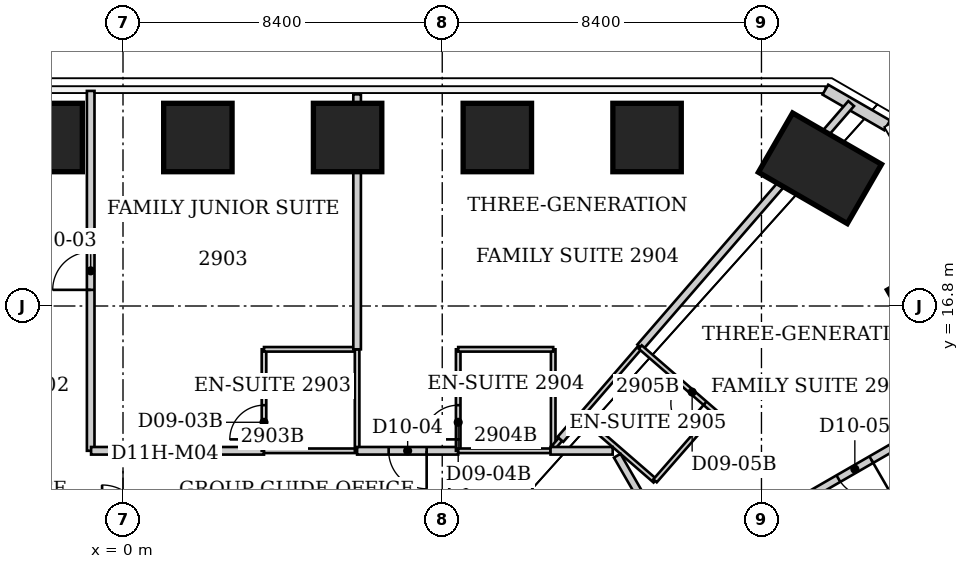
"""IFC4 building model, lengths in metres.
Left out: names, types, materials, properties, quantities, classifications, styles, units other than length and angle.
Written with IfcOpenShell. Run it as: python <this file> out.ifc"""

import sys

from ifc_helpers import new_model, si_unit, direction, frame, frame_2d, origin, origin_2d, place, context, subcontext, project, spatial, rectangle, extrude, element, fill, save


model = new_model("IFC4")
c1 = context("Model", 3, precision=1e-05, world=origin(), true_north=direction((0.0, 1.0)))
c2 = subcontext(c1, "Body", "Model", "MODEL_VIEW")
j1 = project(units=[si_unit("LENGTHUNIT", "METRE"), si_unit("PLANEANGLEUNIT", "RADIAN")], contexts=[c1])
p1 = place(None, origin())
s1 = spatial("IfcSite", under=j1, at=p1, CompositionType="ELEMENT")
p2 = place(p1, origin())
s2 = spatial("IfcBuilding", under=s1, at=p2, CompositionType="ELEMENT")
p3 = place(p2, frame((0.0, 0.0, 119.6)))
s3 = spatial("IfcBuildingStorey", under=s2, at=p3, CompositionType="ELEMENT", Elevation=119.6)
for number, where, z_axis, x_axis in (
    (1, (-1.97, 21.234, 0.0), (0.0, 0.0, 1.0), (0.0, 1.0, 0.0)),
    (2, (1.97, 21.234, 0.0), (0.0, 0.0, 1.0), (0.0, 1.0, 0.0)),
    (3, (5.91, 21.234, 0.0), (0.0, 0.0, 1.0), (0.0, 1.0, 0.0)),
    (4, (9.85, 21.234, 0.0), (0.0, 0.0, 1.0), (0.0, 1.0, 0.0)),
    (5, (13.79, 21.234, 0.0), (0.0, 0.0, 1.0), (0.0, 1.0, 0.0)),
):
    element("IfcColumn", number, at=place(p3, frame(where, z_axis=z_axis, x_axis=x_axis)), inside=s3, PredefinedType="COLUMN", context=c2, shape_type="SweptSolid", body=[
        extrude(rectangle(XDim=1.8, YDim=1.8, at=origin_2d()), origin(), (0.0, 0.0, 1.0), 3.8),
    ])
p4 = place(p3, frame((18.339, 20.424, 0.0), z_axis=(0.0, 0.0, 1.0), x_axis=(0.5, 0.866025403784, 0.0)))
e6 = element("IfcColumn", 6, at=p4, inside=s3, PredefinedType="COLUMN", context=c2, shape_type="SweptSolid", body=[
    extrude(rectangle(XDim=1.8, YDim=2.7, at=origin_2d()), origin(), (0.0, 0.0, 1.0), 3.8),
])
p5 = place(p3, frame((21.346, 16.891, 0.0), z_axis=(0.0, 0.0, 1.0), x_axis=(0.866025403784, 0.5, 0.0)))
e7 = element("IfcColumn", 7, at=p5, inside=s3, PredefinedType="COLUMN", context=c2, shape_type="SweptSolid", body=[
    extrude(rectangle(XDim=1.8, YDim=1.8, at=origin_2d()), origin(), (0.0, 0.0, 1.0), 3.8),
])
p6 = place(p3, frame((18.481, 22.494, 0.0), z_axis=(0.0, 0.0, 1.0), x_axis=(0.865988793993, -0.500063404658, 0.0)))
e8 = element("IfcWall", 8, at=p6, inside=s3, PredefinedType="SOLIDWALL", context=c2, shape_type="SweptSolid", body=[
    extrude(rectangle(XDim=1.88, YDim=0.3, at=frame_2d((0.94, 0.0))), origin(), (0.0, 0.0, 1.0), 3.64),
])
p7 = place(p3, frame((-0.85, 12.99, 0.0), z_axis=(0.0, 0.0, 1.0), x_axis=(0.0, 1.0, 0.0)))
e9 = element("IfcWall", 9, at=p7, inside=s3, PredefinedType="PARTITIONING", context=c2, shape_type="SweptSolid", body=[
    extrude(rectangle(XDim=9.47, YDim=0.2, at=frame_2d((4.735, 0.0))), origin(), (0.0, 0.0, 1.0), 3.64),
])
p8 = place(p7, frame((4.235, 0.0, 0.0)))
e10 = element("IfcOpeningElement", 10, at=p8, cuts=e9, PredefinedType="OPENING", context=c2, shape_type="SweptSolid", body=[
    extrude(rectangle(XDim=1.0, YDim=2.13, at=frame_2d((0.5, 1.065))), frame((0.0, 0.1, 0.0), z_axis=(0.0, -1.0, 0.0), x_axis=(1.0, 0.0, 0.0)), (0.0, 0.0, 1.0), 0.2),
])
p9 = place(p3, frame((3.71, 12.99, 0.0), z_axis=(0.0, 0.0, 1.0), x_axis=(-1.0, 0.0, 0.0)))
e11 = element("IfcWall", 11, at=p9, inside=s3, PredefinedType="PARTITIONING", context=c2, shape_type="SweptSolid", body=[
    extrude(rectangle(XDim=4.55, YDim=0.2, at=frame_2d((2.275, 0.0))), origin(), (0.0, 0.0, 1.0), 3.64),
])
p10 = place(p3, frame((3.71, 15.66, 0.0), z_axis=(0.0, 0.0, 1.0), x_axis=(0.0, -1.0, 0.0)))
e12 = element("IfcWall", 12, at=p10, inside=s3, PredefinedType="PARTITIONING", context=c2, shape_type="SweptSolid", body=[
    extrude(rectangle(XDim=2.67, YDim=0.12, at=frame_2d((1.335, 0.0))), origin(), (0.0, 0.0, 1.0), 3.64),
])
p11 = place(p10, frame((1.47, 0.0, 0.0)))
e13 = element("IfcOpeningElement", 13, at=p11, cuts=e12, PredefinedType="OPENING", context=c2, shape_type="SweptSolid", body=[
    extrude(rectangle(XDim=0.9, YDim=2.03, at=frame_2d((0.45, 1.015))), frame((0.0, 0.06, 0.0), z_axis=(0.0, -1.0, 0.0), x_axis=(1.0, 0.0, 0.0)), (0.0, 0.0, 1.0), 0.12),
])
for number, where, z_axis, x_axis in (
    (14, (6.16, 12.99, 0.0), (0.0, 0.0, 1.0), (-1.0, 0.0, 0.0)),
    (15, (6.16, 15.66, 0.0), (0.0, 0.0, 1.0), (-1.0, 0.0, 0.0)),
):
    element("IfcWall", number, at=place(p3, frame(where, z_axis=z_axis, x_axis=x_axis)), inside=s3, PredefinedType="PARTITIONING", context=c2, shape_type="SweptSolid", body=[
        extrude(rectangle(XDim=2.45, YDim=0.12, at=frame_2d((1.225, 0.0))), origin(), (0.0, 0.0, 1.0), 3.64),
    ])
p12 = place(p3, frame((6.16, 15.66, 0.0), z_axis=(0.0, 0.0, 1.0), x_axis=(0.0, -1.0, 0.0)))
e16 = element("IfcWall", 16, at=p12, inside=s3, PredefinedType="PARTITIONING", context=c2, shape_type="SweptSolid", body=[
    extrude(rectangle(XDim=2.67, YDim=0.12, at=frame_2d((1.335, 0.0))), origin(), (0.0, 0.0, 1.0), 3.64),
])
p13 = place(p3, frame((6.16, 22.37, 0.0), z_axis=(0.0, 0.0, 1.0), x_axis=(0.0, -1.0, 0.0)))
e17 = element("IfcWall", 17, at=p13, inside=s3, PredefinedType="PARTITIONING", context=c2, shape_type="SweptSolid", body=[
    extrude(rectangle(XDim=6.71, YDim=0.2, at=frame_2d((3.355, 0.0))), origin(), (0.0, 0.0, 1.0), 3.64),
])
p14 = place(p3, frame((8.82, 12.99, 0.0), z_axis=(0.0, 0.0, 1.0), x_axis=(-1.0, 0.0, 0.0)))
e18 = element("IfcWall", 18, at=p14, inside=s3, PredefinedType="PARTITIONING", context=c2, shape_type="SweptSolid", body=[
    extrude(rectangle(XDim=2.66, YDim=0.2, at=frame_2d((1.33, 0.0))), origin(), (0.0, 0.0, 1.0), 3.64),
])
p15 = place(p14, frame((0.83, 0.0, 0.0)))
e19 = element("IfcOpeningElement", 19, at=p15, cuts=e18, PredefinedType="OPENING", context=c2, shape_type="SweptSolid", body=[
    extrude(rectangle(XDim=1.0, YDim=2.13, at=frame_2d((0.5, 1.065))), frame((0.0, 0.1, 0.0), z_axis=(0.0, -1.0, 0.0), x_axis=(1.0, 0.0, 0.0)), (0.0, 0.0, 1.0), 0.2),
])
p16 = place(p3, frame((8.82, 15.66, 0.0), z_axis=(0.0, 0.0, 1.0), x_axis=(0.0, -1.0, 0.0)))
e20 = element("IfcWall", 20, at=p16, inside=s3, PredefinedType="PARTITIONING", context=c2, shape_type="SweptSolid", body=[
    extrude(rectangle(XDim=2.67, YDim=0.12, at=frame_2d((1.335, 0.0))), origin(), (0.0, 0.0, 1.0), 3.64),
])
p17 = place(p16, frame((1.47, 0.0, 0.0)))
e21 = element("IfcOpeningElement", 21, at=p17, cuts=e20, PredefinedType="OPENING", context=c2, shape_type="SweptSolid", body=[
    extrude(rectangle(XDim=0.9, YDim=2.03, at=frame_2d((0.45, 1.015))), frame((0.0, 0.06, 0.0), z_axis=(0.0, -1.0, 0.0), x_axis=(1.0, 0.0, 0.0)), (0.0, 0.0, 1.0), 0.12),
])
p18 = place(p3, frame((11.25, 12.99, 0.0), z_axis=(0.0, 0.0, 1.0), x_axis=(-1.0, 0.0, 0.0)))
e22 = element("IfcWall", 22, at=p18, inside=s3, PredefinedType="PARTITIONING", context=c2, shape_type="SweptSolid", body=[
    extrude(rectangle(XDim=2.43, YDim=0.12, at=frame_2d((1.215, 0.0))), origin(), (0.0, 0.0, 1.0), 3.64),
])
p19 = place(p3, frame((11.32, 13.07, 0.0), z_axis=(0.0, 0.0, 1.0), x_axis=(0.0, 1.0, 0.0)))
e23 = element("IfcWall", 23, at=p19, inside=s3, PredefinedType="PARTITIONING", context=c2, shape_type="SweptSolid", body=[
    extrude(rectangle(XDim=2.59, YDim=0.12, at=frame_2d((1.295, 0.0))), origin(), (0.0, 0.0, 1.0), 3.64),
])
p20 = place(p3, frame((11.32, 15.66, 0.0), z_axis=(0.0, 0.0, 1.0), x_axis=(-1.0, 0.0, 0.0)))
e24 = element("IfcWall", 24, at=p20, inside=s3, PredefinedType="PARTITIONING", context=c2, shape_type="SweptSolid", body=[
    extrude(rectangle(XDim=2.5, YDim=0.12, at=frame_2d((1.25, 0.0))), origin(), (0.0, 0.0, 1.0), 3.64),
])
p21 = place(p3, frame((11.336, 13.089, 0.0), z_axis=(0.0, 0.0, 1.0), x_axis=(0.65328489719, 0.757112173396, 0.0)))
e25 = element("IfcWall", 25, at=p21, inside=s3, PredefinedType="PARTITIONING", context=c2, shape_type="SweptSolid", body=[
    extrude(rectangle(XDim=0.266, YDim=0.12, at=frame_2d((0.133, 0.0))), origin(), (0.0, 0.0, 1.0), 3.64),
])
p22 = place(p3, frame((11.51, 13.29, 0.0), z_axis=(0.0, 0.0, 1.0), x_axis=(0.655976713225, 0.754781128345, 0.0)))
e26 = element("IfcWall", 26, at=p22, inside=s3, PredefinedType="PARTITIONING", context=c2, shape_type="SweptSolid", body=[
    extrude(rectangle(XDim=0.808, YDim=0.2, at=frame_2d((0.404, 0.0))), origin(), (0.0, 0.0, 1.0), 3.64),
])
p23 = place(p3, frame((12.039, 13.901, 0.0), z_axis=(0.0, 0.0, 1.0), x_axis=(0.653622514847, 0.756820723874, 0.0)))
e27 = element("IfcWall", 27, at=p23, inside=s3, PredefinedType="PARTITIONING", context=c2, shape_type="SweptSolid", body=[
    extrude(rectangle(XDim=2.404, YDim=0.12, at=frame_2d((1.202, 0.0))), origin(), (0.0, 0.0, 1.0), 3.64),
])
p24 = place(p3, frame((12.04, 13.9, 0.0), z_axis=(0.0, 0.0, 1.0), x_axis=(0.755437535555, -0.655220672655, 0.0)))
e28 = element("IfcWall", 28, at=p24, inside=s3, PredefinedType="PARTITIONING", context=c2, shape_type="SweptSolid", body=[
    extrude(rectangle(XDim=2.594, YDim=0.12, at=frame_2d((1.297, 0.0))), origin(), (0.0, 0.0, 1.0), 3.64),
])
p25 = place(p3, frame((12.885, 12.99, 0.0), z_axis=(0.0, 0.0, 1.0), x_axis=(-1.0, 0.0, 0.0)))
e29 = element("IfcWall", 29, at=p25, inside=s3, PredefinedType="PARTITIONING", context=c2, shape_type="SweptSolid", body=[
    extrude(rectangle(XDim=1.635, YDim=0.2, at=frame_2d((0.817, 0.0))), origin(), (0.0, 0.0, 1.0), 3.64),
])
p26 = place(p3, frame((13.005, 12.86, 0.0), z_axis=(0.0, 0.0, 1.0), x_axis=(0.500007161152, -0.866021269252, 0.0)))
e30 = element("IfcWall", 30, at=p26, inside=s3, PredefinedType="PARTITIONING", context=c2, shape_type="SweptSolid", body=[
    extrude(rectangle(XDim=3.415, YDim=0.2, at=frame_2d((1.707, 0.0))), origin(), (0.0, 0.0, 1.0), 3.64),
])
p27 = place(p3, frame((13.61, 15.72, 0.0), z_axis=(0.0, 0.0, 1.0), x_axis=(0.654752892245, 0.75584300625, 0.0)))
e31 = element("IfcWall", 31, at=p27, inside=s3, PredefinedType="PARTITIONING", context=c2, shape_type="SweptSolid", body=[
    extrude(rectangle(XDim=8.477, YDim=0.2, at=frame_2d((4.238, 0.0))), origin(), (0.0, 0.0, 1.0), 3.64),
])
p28 = place(p3, frame((14.0, 12.2, 0.0), z_axis=(0.0, 0.0, 1.0), x_axis=(0.657626528627, 0.753344110514, 0.0)))
e32 = element("IfcWall", 32, at=p28, inside=s3, PredefinedType="PARTITIONING", context=c2, shape_type="SweptSolid", body=[
    extrude(rectangle(XDim=2.403, YDim=0.12, at=frame_2d((1.201, 0.0))), origin(), (0.0, 0.0, 1.0), 3.64),
])
p29 = place(p3, frame((15.58, 14.01, 0.0), z_axis=(0.0, 0.0, 1.0), x_axis=(-0.755185511235, 0.655511131576, 0.0)))
e33 = element("IfcWall", 33, at=p29, inside=s3, PredefinedType="PARTITIONING", context=c2, shape_type="SweptSolid", body=[
    extrude(rectangle(XDim=2.609, YDim=0.12, at=frame_2d((1.304, 0.0))), origin(), (0.0, 0.0, 1.0), 3.64),
])
p30 = place(p29, frame((0.35, 0.0, 0.0)))
e34 = element("IfcOpeningElement", 34, at=p30, cuts=e33, PredefinedType="OPENING", context=c2, shape_type="SweptSolid", body=[
    extrude(rectangle(XDim=0.9, YDim=2.03, at=frame_2d((0.45, 1.015))), frame((0.0, 0.06, 0.0), z_axis=(0.0, -1.0, 0.0), x_axis=(1.0, 0.0, 0.0)), (0.0, 0.0, 1.0), 0.12),
])
p31 = place(p3, frame((18.46, 9.27, 0.0), z_axis=(0.0, 0.0, 1.0), x_axis=(0.865880021885, 0.500251724335, 0.0)))
e35 = element("IfcWall", 35, at=p31, inside=s3, PredefinedType="PARTITIONING", context=c2, shape_type="SweptSolid", body=[
    extrude(rectangle(XDim=7.546, YDim=0.2, at=frame_2d((3.773, 0.0))), origin(), (0.0, 0.0, 1.0), 3.64),
])
p32 = place(p31, frame((3.273, 0.0, 0.0)))
e36 = element("IfcOpeningElement", 36, at=p32, cuts=e35, PredefinedType="OPENING", context=c2, shape_type="SweptSolid", body=[
    extrude(rectangle(XDim=1.0, YDim=2.13, at=frame_2d((0.5, 1.065))), frame((0.0, 0.1, 0.0), z_axis=(0.0, -1.0, 0.0), x_axis=(1.0, 0.0, 0.0)), (0.0, 0.0, 1.0), 0.2),
])
p33 = place(p3, frame((23.794, 15.125, 0.0), z_axis=(0.0, 0.0, 1.0), x_axis=(-0.866190629897, -0.499713710718, 0.0)))
e37 = element("IfcWall", 37, at=p33, inside=s3, PredefinedType="PARTITIONING", context=c2, shape_type="SweptSolid", body=[
    extrude(rectangle(XDim=10.476, YDim=0.2, at=frame_2d((5.238, 0.0))), origin(), (0.0, 0.0, 1.0), 3.64),
])
p34 = place(p33, frame((4.738, 0.0, 0.0)))
e38 = element("IfcOpeningElement", 38, at=p34, cuts=e37, PredefinedType="OPENING", context=c2, shape_type="SweptSolid", body=[
    extrude(rectangle(XDim=1.0, YDim=2.13, at=frame_2d((0.5, 1.065))), frame((0.0, 0.1, 0.0), z_axis=(0.0, -1.0, 0.0), x_axis=(1.0, 0.0, 0.0)), (0.0, 0.0, 1.0), 0.2),
])
p35 = place(p8, origin())
e39 = element("IfcDoor", 39, at=p35, inside=s3, OperationType="SINGLE_SWING_LEFT", PredefinedType="DOOR", context=c2, shape_type="SweptSolid", body=[
    extrude(rectangle(XDim=1.0, YDim=2.13, at=frame_2d((0.5, 1.065))), frame((0.0, 0.025, 0.0), z_axis=(0.0, -1.0, 0.0), x_axis=(1.0, 0.0, 0.0)), (0.0, 0.0, 1.0), 0.05),
])
fill(e10, e39)
p36 = place(p11, origin())
e40 = element("IfcDoor", 40, at=p36, inside=s3, OperationType="SINGLE_SWING_RIGHT", PredefinedType="DOOR", context=c2, shape_type="SweptSolid", body=[
    extrude(rectangle(XDim=0.9, YDim=2.03, at=frame_2d((0.45, 1.015))), frame((0.0, 0.025, 0.0), z_axis=(0.0, -1.0, 0.0), x_axis=(1.0, 0.0, 0.0)), (0.0, 0.0, 1.0), 0.05),
])
fill(e13, e40)
p37 = place(p15, origin())
e41 = element("IfcDoor", 41, at=p37, inside=s3, OperationType="SINGLE_SWING_LEFT", PredefinedType="DOOR", context=c2, shape_type="SweptSolid", body=[
    extrude(rectangle(XDim=1.0, YDim=2.13, at=frame_2d((0.5, 1.065))), frame((0.0, 0.025, 0.0), z_axis=(0.0, -1.0, 0.0), x_axis=(1.0, 0.0, 0.0)), (0.0, 0.0, 1.0), 0.05),
])
fill(e19, e41)
p38 = place(p17, origin())
e42 = element("IfcDoor", 42, at=p38, inside=s3, OperationType="SINGLE_SWING_RIGHT", PredefinedType="DOOR", context=c2, shape_type="SweptSolid", body=[
    extrude(rectangle(XDim=0.9, YDim=2.03, at=frame_2d((0.45, 1.015))), frame((0.0, 0.025, 0.0), z_axis=(0.0, -1.0, 0.0), x_axis=(1.0, 0.0, 0.0)), (0.0, 0.0, 1.0), 0.05),
])
fill(e21, e42)
p39 = place(p34, origin())
e43 = element("IfcDoor", 43, at=p39, inside=s3, OperationType="SINGLE_SWING_LEFT", PredefinedType="DOOR", context=c2, shape_type="SweptSolid", body=[
    extrude(rectangle(XDim=1.0, YDim=2.13, at=frame_2d((0.5, 1.065))), frame((0.0, 0.025, 0.0), z_axis=(0.0, -1.0, 0.0), x_axis=(1.0, 0.0, 0.0)), (0.0, 0.0, 1.0), 0.05),
])
fill(e38, e43)
p40 = place(p30, origin())
e44 = element("IfcDoor", 44, at=p40, inside=s3, OperationType="SINGLE_SWING_LEFT", PredefinedType="DOOR", context=c2, shape_type="SweptSolid", body=[
    extrude(rectangle(XDim=0.9, YDim=2.03, at=frame_2d((0.45, 1.015))), frame((0.0, 0.025, 0.0), z_axis=(0.0, -1.0, 0.0), x_axis=(1.0, 0.0, 0.0)), (0.0, 0.0, 1.0), 0.05),
])
fill(e34, e44)
save(model, sys.argv[1])
